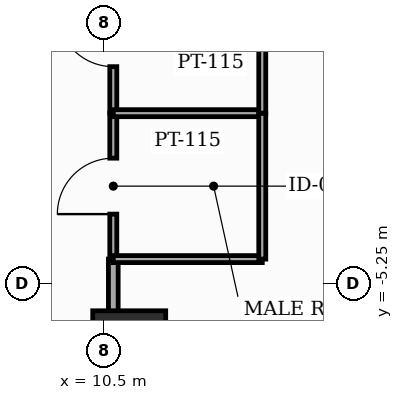
"""IFC4 building model, lengths in metres.
Left out: names, types, materials, properties, quantities, classifications, styles, units other than length and angle.
Written with IfcOpenShell. Run it as: python <this file> out.ifc"""

import sys

from ifc_helpers import new_model, si_unit, direction, frame, frame_2d, origin, origin_2d, place, context, subcontext, project, spatial, rectangle, extrude, element, fill, save


model = new_model("IFC4")
c1 = context("Model", 3, precision=1e-05, world=origin(), true_north=direction((0.0, 1.0)))
c2 = subcontext(c1, "Body", "Model", "MODEL_VIEW")
j1 = project(units=[si_unit("LENGTHUNIT", "METRE"), si_unit("PLANEANGLEUNIT", "RADIAN")], contexts=[c1])
p1 = place(None, origin())
s1 = spatial("IfcSite", under=j1, at=p1, CompositionType="ELEMENT")
p2 = place(p1, origin())
s2 = spatial("IfcBuilding", under=s1, at=p2, CompositionType="ELEMENT")
p3 = place(p2, frame((0.0, 0.0, 162.0)))
s3 = spatial("IfcBuildingStorey", under=s2, at=p3, CompositionType="ELEMENT", Elevation=162.0)
p4 = place(p3, frame((10.912, -6.3, 0.0), z_axis=(0.0, 0.0, 1.0), x_axis=(1.0, 0.0, 0.0)))
e1 = element("IfcColumn", 1, at=p4, inside=s3, PredefinedType="COLUMN", context=c2, shape_type="SweptSolid", body=[
    extrude(rectangle(XDim=1.2, YDim=1.2, at=origin_2d()), origin(), (0.0, 0.0, 1.0), 3.7),
])
p5 = place(p3, frame((10.65, -4.85, 0.0), z_axis=(0.0, 0.0, 1.0), x_axis=(0.0, 1.0, 0.0)))
e2 = element("IfcWall", 2, at=p5, inside=s3, PredefinedType="PARTITIONING", context=c2, shape_type="SweptSolid", body=[
    extrude(rectangle(XDim=2.4, YDim=0.115, at=frame_2d((1.2, 0.0))), origin(), (0.0, 0.0, 1.0), 3.5),
])
p6 = place(p5, frame((0.74, 0.0, 0.0)))
e3 = element("IfcOpeningElement", 3, at=p6, cuts=e2, PredefinedType="OPENING", context=c2, shape_type="SweptSolid", body=[
    extrude(rectangle(XDim=0.92, YDim=2.1, at=frame_2d((0.46, 1.05))), frame((0.0, 0.067, 0.0), z_axis=(0.0, -1.0, 0.0), x_axis=(1.0, 0.0, 0.0)), (0.0, 0.0, 1.0), 0.135),
])
p7 = place(p3, frame((10.65, -2.45, 0.0), z_axis=(0.0, 0.0, 1.0), x_axis=(0.0, 1.0, 0.0)))
e4 = element("IfcWall", 4, at=p7, inside=s3, PredefinedType="PARTITIONING", context=c2, shape_type="SweptSolid", body=[
    extrude(rectangle(XDim=2.45, YDim=0.115, at=frame_2d((1.225, 0.0))), origin(), (0.0, 0.0, 1.0), 2.885),
])
p8 = place(p7, frame((0.765, 0.0, 0.0)))
e5 = element("IfcOpeningElement", 5, at=p8, cuts=e4, PredefinedType="OPENING", context=c2, shape_type="SweptSolid", body=[
    extrude(rectangle(XDim=0.92, YDim=2.1, at=frame_2d((0.46, 1.05))), frame((0.0, 0.067, 0.0), z_axis=(0.0, -1.0, 0.0), x_axis=(1.0, 0.0, 0.0)), (0.0, 0.0, 1.0), 0.135),
])
p9 = place(p3, frame((10.65, -10.15, 0.0), z_axis=(0.0, 0.0, 1.0), x_axis=(0.0, 1.0, 0.0)))
e6 = element("IfcWall", 6, at=p9, inside=s3, PredefinedType="PARTITIONING", context=c2, shape_type="SweptSolid", body=[
    extrude(rectangle(XDim=5.3, YDim=0.16, at=frame_2d((2.65, 0.0))), origin(), (0.0, 0.0, 1.0), 2.885),
])
p10 = place(p9, frame((0.56, 0.0, 0.0)))
e7 = element("IfcOpeningElement", 7, at=p10, cuts=e6, PredefinedType="OPENING", context=c2, shape_type="SweptSolid", body=[
    extrude(rectangle(XDim=1.0, YDim=2.15, at=frame_2d((0.5, 1.075))), frame((0.0, 0.09, 0.0), z_axis=(0.0, -1.0, 0.0), x_axis=(1.0, 0.0, 0.0)), (0.0, 0.0, 1.0), 0.18),
])
for number, where, z_axis, x_axis in (
    (8, (13.1, -2.45, 0.0), (0.0, 0.0, 1.0), (-1.0, 0.0, 0.0)),
    (9, (10.65, -4.85, 0.0), (0.0, 0.0, 1.0), (1.0, 0.0, 0.0)),
):
    element("IfcWall", number, at=place(p3, frame(where, z_axis=z_axis, x_axis=x_axis)), inside=s3, PredefinedType="PARTITIONING", context=c2, shape_type="SweptSolid", body=[
        extrude(rectangle(XDim=2.45, YDim=0.115, at=frame_2d((1.225, 0.0))), origin(), (0.0, 0.0, 1.0), 2.885),
    ])
p11 = place(p3, frame((13.1, -4.85, 0.0), z_axis=(0.0, 0.0, 1.0), x_axis=(0.0, 1.0, 0.0)))
e10 = element("IfcWall", 10, at=p11, inside=s3, PredefinedType="PARTITIONING", context=c2, shape_type="SweptSolid", body=[
    extrude(rectangle(XDim=2.4, YDim=0.115, at=frame_2d((1.2, 0.0))), origin(), (0.0, 0.0, 1.0), 3.5),
])
p12 = place(p3, frame((13.1, -2.45, 0.0), z_axis=(0.0, 0.0, 1.0), x_axis=(0.0, 1.0, 0.0)))
e11 = element("IfcWall", 11, at=p12, inside=s3, PredefinedType="PARTITIONING", context=c2, shape_type="SweptSolid", body=[
    extrude(rectangle(XDim=2.45, YDim=0.115, at=frame_2d((1.225, 0.0))), origin(), (0.0, 0.0, 1.0), 2.885),
])
p13 = place(p6, origin())
e12 = element("IfcDoor", 12, at=p13, inside=s3, OperationType="SINGLE_SWING_LEFT", PredefinedType="DOOR", context=c2, shape_type="SweptSolid", body=[
    extrude(rectangle(XDim=0.92, YDim=2.1, at=frame_2d((0.46, 1.05))), frame((0.0, 0.025, 0.0), z_axis=(0.0, -1.0, 0.0), x_axis=(1.0, 0.0, 0.0)), (0.0, 0.0, 1.0), 0.05),
])
fill(e3, e12)
p14 = place(p8, origin())
e13 = element("IfcDoor", 13, at=p14, inside=s3, OperationType="SINGLE_SWING_RIGHT", PredefinedType="DOOR", context=c2, shape_type="SweptSolid", body=[
    extrude(rectangle(XDim=0.92, YDim=2.1, at=frame_2d((0.46, 1.05))), frame((0.0, 0.025, 0.0), z_axis=(0.0, -1.0, 0.0), x_axis=(1.0, 0.0, 0.0)), (0.0, 0.0, 1.0), 0.05),
])
fill(e5, e13)
save(model, sys.argv[1])
